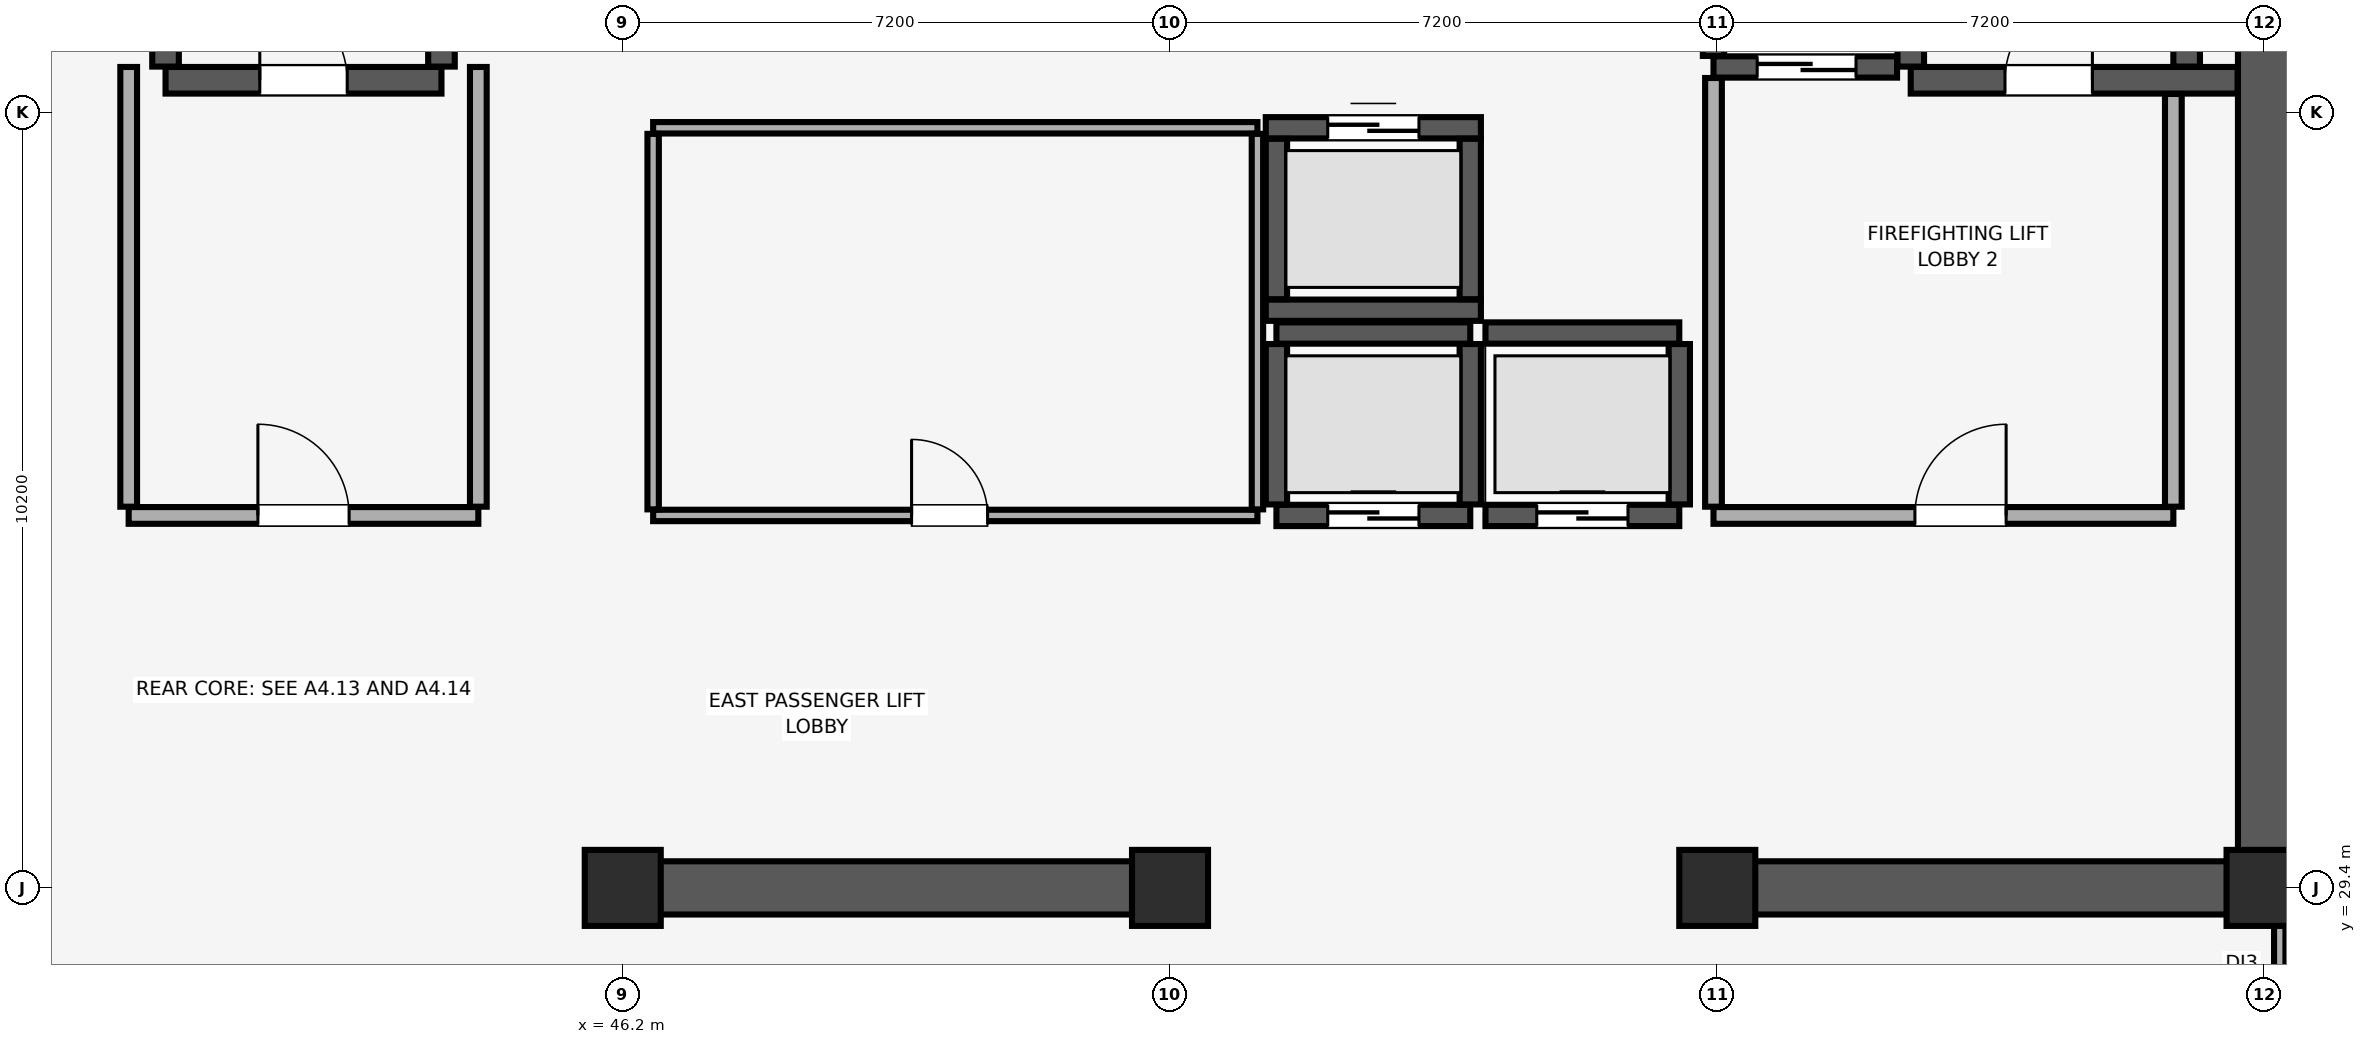
"""IFC4 building model, lengths in metres.
Left out: names, types, materials, properties, quantities, classifications, styles, units other than length and angle.
Written with IfcOpenShell. Run it as: python <this file> out.ifc"""

import sys

from ifc_helpers import new_model, si_unit, direction, frame, frame_2d, origin, origin_2d, place, context, subcontext, project, spatial, rectangle, extrude, element, fill, save


model = new_model("IFC4")
c1 = context("Model", 3, precision=1e-05, world=origin(), true_north=direction((0.0, 1.0)))
c2 = subcontext(c1, "Body", "Model", "MODEL_VIEW")
j1 = project(units=[si_unit("LENGTHUNIT", "METRE"), si_unit("PLANEANGLEUNIT", "RADIAN")], contexts=[c1])
p1 = place(None, origin())
s1 = spatial("IfcSite", under=j1, at=p1, CompositionType="ELEMENT")
p2 = place(p1, origin())
s2 = spatial("IfcBuilding", under=s1, at=p2, CompositionType="ELEMENT")
p3 = place(p2, frame((0.0, 0.0, 305.7)))
s3 = spatial("IfcBuildingStorey", under=s2, at=p3, CompositionType="ELEMENT", Elevation=305.7)
for number, where, z_axis, x_axis in (
    (1, (46.2, 29.4, 0.0), (0.0, 0.0, 1.0), (1.0, 0.0, 0.0)),
    (2, (53.4, 29.4, 0.0), (0.0, 0.0, 1.0), (1.0, 0.0, 0.0)),
    (3, (60.6, 29.4, 0.0), (0.0, 0.0, 1.0), (1.0, 0.0, 0.0)),
    (4, (67.8, 29.4, 0.0), (0.0, 0.0, 1.0), (1.0, 0.0, 0.0)),
):
    element("IfcColumn", number, at=place(p3, frame(where, z_axis=z_axis, x_axis=x_axis)), inside=s3, PredefinedType="COLUMN", context=c2, shape_type="SweptSolid", body=[
        extrude(rectangle(XDim=1.0, YDim=1.0, at=origin_2d()), origin(), (0.0, 0.0, 1.0), 4.7),
    ])
p4 = place(p3, frame((67.8, 29.4, 0.0), z_axis=(0.0, 0.0, 1.0), x_axis=(0.0, 1.0, 0.0)))
e5 = element("IfcWall", 5, at=p4, inside=s3, PredefinedType="SHEAR", context=c2, shape_type="SweptSolid", body=[
    extrude(rectangle(XDim=19.2, YDim=0.7, at=frame_2d((9.6, 0.0))), origin(), (0.0, 0.0, 1.0), 4.7),
])
p5 = place(p3, frame((46.0, 29.4, 0.0), z_axis=(0.0, 0.0, 1.0), x_axis=(1.0, 0.0, 0.0)))
e6 = element("IfcWall", 6, at=p5, inside=s3, PredefinedType="SHEAR", context=c2, shape_type="SweptSolid", body=[
    extrude(rectangle(XDim=7.6, YDim=0.7, at=frame_2d((3.8, 0.0))), origin(), (0.0, 0.0, 1.0), 4.7),
])
p6 = place(p3, frame((60.4, 29.4, 0.0), z_axis=(0.0, 0.0, 1.0), x_axis=(1.0, 0.0, 0.0)))
e7 = element("IfcWall", 7, at=p6, inside=s3, PredefinedType="SHEAR", context=c2, shape_type="SweptSolid", body=[
    extrude(rectangle(XDim=7.045, YDim=0.7, at=frame_2d((3.522, 0.0))), origin(), (0.0, 0.0, 1.0), 4.7),
])
p7 = place(p3, frame((40.185, 40.025, 0.0), z_axis=(0.0, 0.0, 1.0), x_axis=(1.0, 0.0, 0.0)))
e8 = element("IfcWall", 8, at=p7, inside=s3, PredefinedType="SHEAR", context=c2, shape_type="SweptSolid", body=[
    extrude(rectangle(XDim=3.63, YDim=0.35, at=frame_2d((1.815, 0.0))), origin(), (0.0, 0.0, 1.0), 4.7),
])
p8 = place(p7, frame((1.24, 0.0, 0.0)))
e9 = element("IfcOpeningElement", 9, at=p8, cuts=e8, PredefinedType="OPENING", context=c2, shape_type="SweptSolid", body=[
    extrude(rectangle(XDim=1.15, YDim=2.15, at=frame_2d((0.575, 1.075))), frame((0.0, 0.185, 0.0), z_axis=(0.0, -1.0, 0.0), x_axis=(1.0, 0.0, 0.0)), (0.0, 0.0, 1.0), 0.37),
])
for number, where, z_axis, x_axis in (
    (10, (40.185, 40.205, 0.0), (0.0, 0.0, 1.0), (0.0, 1.0, 0.0)),
    (11, (43.815, 40.205, 0.0), (0.0, 0.0, 1.0), (0.0, 1.0, 0.0)),
):
    element("IfcWall", number, at=place(p3, frame(where, z_axis=z_axis, x_axis=x_axis)), inside=s3, PredefinedType="SHEAR", context=c2, shape_type="SweptSolid", body=[
        extrude(rectangle(XDim=8.09, YDim=0.35, at=frame_2d((4.045, 0.0))), origin(), (0.0, 0.0, 1.0), 4.7),
    ])
p9 = place(p3, frame((63.145, 40.025, 0.0), z_axis=(0.0, 0.0, 1.0), x_axis=(1.0, 0.0, 0.0)))
e12 = element("IfcWall", 12, at=p9, inside=s3, PredefinedType="SHEAR", context=c2, shape_type="SweptSolid", body=[
    extrude(rectangle(XDim=4.3, YDim=0.35, at=frame_2d((2.15, 0.0))), origin(), (0.0, 0.0, 1.0), 4.7),
])
p10 = place(p9, frame((1.24, 0.0, 0.0)))
e13 = element("IfcOpeningElement", 13, at=p10, cuts=e12, PredefinedType="OPENING", context=c2, shape_type="SweptSolid", body=[
    extrude(rectangle(XDim=1.15, YDim=2.15, at=frame_2d((0.575, 1.075))), frame((0.0, 0.185, 0.0), z_axis=(0.0, -1.0, 0.0), x_axis=(1.0, 0.0, 0.0)), (0.0, 0.0, 1.0), 0.37),
])
for number, where, z_axis, x_axis in (
    (14, (63.145, 40.205, 0.0), (0.0, 0.0, 1.0), (0.0, 1.0, 0.0)),
    (15, (66.775, 40.205, 0.0), (0.0, 0.0, 1.0), (0.0, 1.0, 0.0)),
):
    element("IfcWall", number, at=place(p3, frame(where, z_axis=z_axis, x_axis=x_axis)), inside=s3, PredefinedType="SHEAR", context=c2, shape_type="SweptSolid", body=[
        extrude(rectangle(XDim=8.09, YDim=0.35, at=frame_2d((4.045, 0.0))), origin(), (0.0, 0.0, 1.0), 4.7),
    ])
p11 = place(p3, frame((54.8, 34.3, 0.0), z_axis=(0.0, 0.0, 1.0), x_axis=(1.0, 0.0, 0.0)))
e16 = element("IfcWall", 16, at=p11, inside=s3, PredefinedType="SHEAR", context=c2, shape_type="SweptSolid", body=[
    extrude(rectangle(XDim=2.55, YDim=0.28, at=frame_2d((1.275, 0.0))), origin(), (0.0, 0.0, 1.0), 4.7),
])
p12 = place(p11, frame((0.675, 0.0, 0.0)))
e17 = element("IfcOpeningElement", 17, at=p12, cuts=e16, PredefinedType="OPENING", context=c2, shape_type="SweptSolid", body=[
    extrude(rectangle(XDim=1.2, YDim=2.25, at=frame_2d((0.6, 1.125))), frame((0.0, 0.15, 0.0), z_axis=(0.0, -1.0, 0.0), x_axis=(1.0, 0.0, 0.0)), (0.0, 0.0, 1.0), 0.3),
])
p13 = place(p3, frame((54.8, 36.7, 0.0), z_axis=(0.0, 0.0, 1.0), x_axis=(1.0, 0.0, 0.0)))
e18 = element("IfcWall", 18, at=p13, inside=s3, PredefinedType="SHEAR", context=c2, shape_type="SweptSolid", body=[
    extrude(rectangle(XDim=2.55, YDim=0.28, at=frame_2d((1.275, 0.0))), origin(), (0.0, 0.0, 1.0), 4.7),
])
for number, where, z_axis, x_axis in (
    (19, (54.8, 34.445, 0.0), (0.0, 0.0, 1.0), (0.0, 1.0, 0.0)),
    (20, (57.35, 34.445, 0.0), (0.0, 0.0, 1.0), (0.0, 1.0, 0.0)),
):
    element("IfcWall", number, at=place(p3, frame(where, z_axis=z_axis, x_axis=x_axis)), inside=s3, PredefinedType="SHEAR", context=c2, shape_type="SweptSolid", body=[
        extrude(rectangle(XDim=2.11, YDim=0.28, at=frame_2d((1.055, 0.0))), origin(), (0.0, 0.0, 1.0), 4.7),
    ])
p14 = place(p3, frame((57.55, 34.3, 0.0), z_axis=(0.0, 0.0, 1.0), x_axis=(1.0, 0.0, 0.0)))
e21 = element("IfcWall", 21, at=p14, inside=s3, PredefinedType="SHEAR", context=c2, shape_type="SweptSolid", body=[
    extrude(rectangle(XDim=2.55, YDim=0.28, at=frame_2d((1.275, 0.0))), origin(), (0.0, 0.0, 1.0), 4.7),
])
p15 = place(p14, frame((0.675, 0.0, 0.0)))
e22 = element("IfcOpeningElement", 22, at=p15, cuts=e21, PredefinedType="OPENING", context=c2, shape_type="SweptSolid", body=[
    extrude(rectangle(XDim=1.2, YDim=2.25, at=frame_2d((0.6, 1.125))), frame((0.0, 0.15, 0.0), z_axis=(0.0, -1.0, 0.0), x_axis=(1.0, 0.0, 0.0)), (0.0, 0.0, 1.0), 0.3),
])
p16 = place(p3, frame((57.55, 36.7, 0.0), z_axis=(0.0, 0.0, 1.0), x_axis=(1.0, 0.0, 0.0)))
e23 = element("IfcWall", 23, at=p16, inside=s3, PredefinedType="SHEAR", context=c2, shape_type="SweptSolid", body=[
    extrude(rectangle(XDim=2.55, YDim=0.28, at=frame_2d((1.275, 0.0))), origin(), (0.0, 0.0, 1.0), 4.7),
])
p17 = place(p3, frame((60.1, 34.445, 0.0), z_axis=(0.0, 0.0, 1.0), x_axis=(0.0, 1.0, 0.0)))
e24 = element("IfcWall", 24, at=p17, inside=s3, PredefinedType="SHEAR", context=c2, shape_type="SweptSolid", body=[
    extrude(rectangle(XDim=2.11, YDim=0.28, at=frame_2d((1.055, 0.0))), origin(), (0.0, 0.0, 1.0), 4.7),
])
p18 = place(p3, frame((54.66, 37.0, 0.0), z_axis=(0.0, 0.0, 1.0), x_axis=(1.0, 0.0, 0.0)))
e25 = element("IfcWall", 25, at=p18, inside=s3, PredefinedType="SHEAR", context=c2, shape_type="SweptSolid", body=[
    extrude(rectangle(XDim=2.83, YDim=0.28, at=frame_2d((1.415, 0.0))), origin(), (0.0, 0.0, 1.0), 4.7),
])
p19 = place(p3, frame((54.66, 39.4, 0.0), z_axis=(0.0, 0.0, 1.0), x_axis=(1.0, 0.0, 0.0)))
e26 = element("IfcWall", 26, at=p19, inside=s3, PredefinedType="SHEAR", context=c2, shape_type="SweptSolid", body=[
    extrude(rectangle(XDim=2.83, YDim=0.28, at=frame_2d((1.415, 0.0))), origin(), (0.0, 0.0, 1.0), 4.7),
])
p20 = place(p19, frame((0.815, 0.0, 0.0)))
e27 = element("IfcOpeningElement", 27, at=p20, cuts=e26, PredefinedType="OPENING", context=c2, shape_type="SweptSolid", body=[
    extrude(rectangle(XDim=1.2, YDim=2.25, at=frame_2d((0.6, 1.125))), frame((0.0, 0.15, 0.0), z_axis=(0.0, -1.0, 0.0), x_axis=(1.0, 0.0, 0.0)), (0.0, 0.0, 1.0), 0.3),
])
for number, where, z_axis, x_axis in (
    (28, (54.8, 37.145, 0.0), (0.0, 0.0, 1.0), (0.0, 1.0, 0.0)),
    (29, (57.35, 37.145, 0.0), (0.0, 0.0, 1.0), (0.0, 1.0, 0.0)),
):
    element("IfcWall", number, at=place(p3, frame(where, z_axis=z_axis, x_axis=x_axis)), inside=s3, PredefinedType="SHEAR", context=c2, shape_type="SweptSolid", body=[
        extrude(rectangle(XDim=2.11, YDim=0.28, at=frame_2d((1.055, 0.0))), origin(), (0.0, 0.0, 1.0), 4.7),
    ])
p21 = place(p3, frame((60.55, 40.2, 0.0), z_axis=(0.0, 0.0, 1.0), x_axis=(1.0, 0.0, 0.0)))
e30 = element("IfcWall", 30, at=p21, inside=s3, PredefinedType="SHEAR", context=c2, shape_type="SweptSolid", body=[
    extrude(rectangle(XDim=2.415, YDim=0.28, at=frame_2d((1.208, 0.0))), origin(), (0.0, 0.0, 1.0), 4.7),
])
p22 = place(p21, frame((0.575, 0.0, 0.0)))
e31 = element("IfcOpeningElement", 31, at=p22, cuts=e30, PredefinedType="OPENING", context=c2, shape_type="SweptSolid", body=[
    extrude(rectangle(XDim=1.3, YDim=2.3, at=frame_2d((0.65, 1.15))), frame((0.0, 0.15, 0.0), z_axis=(0.0, -1.0, 0.0), x_axis=(1.0, 0.0, 0.0)), (0.0, 0.0, 1.0), 0.3),
])
p23 = place(p3, frame((60.55, 40.345, 0.0), z_axis=(0.0, 0.0, 1.0), x_axis=(0.0, 1.0, 0.0)))
e32 = element("IfcWall", 32, at=p23, inside=s3, PredefinedType="SHEAR", context=c2, shape_type="SweptSolid", body=[
    extrude(rectangle(XDim=2.81, YDim=0.28, at=frame_2d((1.405, 0.0))), origin(), (0.0, 0.0, 1.0), 4.7),
])
p24 = place(p3, frame((60.55, 34.3, 0.0), z_axis=(0.0, 0.0, 1.0), x_axis=(1.0, 0.0, 0.0)))
e33 = element("IfcWall", 33, at=p24, inside=s3, PredefinedType="PARTITIONING", context=c2, shape_type="SweptSolid", body=[
    extrude(rectangle(XDim=6.05, YDim=0.22, at=frame_2d((3.025, 0.0))), origin(), (0.0, 0.0, 1.0), 4.7),
])
p25 = place(p24, frame((2.65, 0.0, 0.0)))
e34 = element("IfcOpeningElement", 34, at=p25, cuts=e33, PredefinedType="OPENING", context=c2, shape_type="SweptSolid", body=[
    extrude(rectangle(XDim=1.2, YDim=2.15, at=frame_2d((0.6, 1.075))), frame((0.0, 0.12, 0.0), z_axis=(0.0, -1.0, 0.0), x_axis=(1.0, 0.0, 0.0)), (0.0, 0.0, 1.0), 0.24),
])
p26 = place(p3, frame((60.55, 34.415, 0.0), z_axis=(0.0, 0.0, 1.0), x_axis=(0.0, 1.0, 0.0)))
e35 = element("IfcWall", 35, at=p26, inside=s3, PredefinedType="PARTITIONING", context=c2, shape_type="SweptSolid", body=[
    extrude(rectangle(XDim=5.64, YDim=0.22, at=frame_2d((2.82, 0.0))), origin(), (0.0, 0.0, 1.0), 4.7),
])
p27 = place(p3, frame((66.6, 34.415, 0.0), z_axis=(0.0, 0.0, 1.0), x_axis=(0.0, 1.0, 0.0)))
e36 = element("IfcWall", 36, at=p27, inside=s3, PredefinedType="PARTITIONING", context=c2, shape_type="SweptSolid", body=[
    extrude(rectangle(XDim=5.43, YDim=0.22, at=frame_2d((2.715, 0.0))), origin(), (0.0, 0.0, 1.0), 4.7),
])
p28 = place(p3, frame((39.7, 34.3, 0.0), z_axis=(0.0, 0.0, 1.0), x_axis=(1.0, 0.0, 0.0)))
e37 = element("IfcWall", 37, at=p28, inside=s3, PredefinedType="PARTITIONING", context=c2, shape_type="SweptSolid", body=[
    extrude(rectangle(XDim=4.6, YDim=0.22, at=frame_2d((2.3, 0.0))), origin(), (0.0, 0.0, 1.0), 4.7),
])
p29 = place(p28, frame((1.7, 0.0, 0.0)))
e38 = element("IfcOpeningElement", 38, at=p29, cuts=e37, PredefinedType="OPENING", context=c2, shape_type="SweptSolid", body=[
    extrude(rectangle(XDim=1.2, YDim=2.15, at=frame_2d((0.6, 1.075))), frame((0.0, 0.12, 0.0), z_axis=(0.0, -1.0, 0.0), x_axis=(1.0, 0.0, 0.0)), (0.0, 0.0, 1.0), 0.24),
])
for number, where, z_axis, x_axis in (
    (39, (39.7, 34.415, 0.0), (0.0, 0.0, 1.0), (0.0, 1.0, 0.0)),
    (40, (44.3, 34.415, 0.0), (0.0, 0.0, 1.0), (0.0, 1.0, 0.0)),
):
    element("IfcWall", number, at=place(p3, frame(where, z_axis=z_axis, x_axis=x_axis)), inside=s3, PredefinedType="PARTITIONING", context=c2, shape_type="SweptSolid", body=[
        extrude(rectangle(XDim=5.785, YDim=0.22, at=frame_2d((2.893, 0.0))), origin(), (0.0, 0.0, 1.0), 4.7),
    ])
p30 = place(p3, frame((46.6, 34.3, 0.0), z_axis=(0.0, 0.0, 1.0), x_axis=(1.0, 0.0, 0.0)))
e41 = element("IfcWall", 41, at=p30, inside=s3, PredefinedType="PARTITIONING", context=c2, shape_type="SweptSolid", body=[
    extrude(rectangle(XDim=7.95, YDim=0.15, at=frame_2d((3.975, 0.0))), origin(), (0.0, 0.0, 1.0), 4.7),
])
p31 = place(p30, frame((3.4, 0.0, 0.0)))
e42 = element("IfcOpeningElement", 42, at=p31, cuts=e41, PredefinedType="OPENING", context=c2, shape_type="SweptSolid", body=[
    extrude(rectangle(XDim=1.0, YDim=2.15, at=frame_2d((0.5, 1.075))), frame((0.0, 0.085, 0.0), z_axis=(0.0, -1.0, 0.0), x_axis=(1.0, 0.0, 0.0)), (0.0, 0.0, 1.0), 0.17),
])
p32 = place(p3, frame((46.6, 39.4, 0.0), z_axis=(0.0, 0.0, 1.0), x_axis=(1.0, 0.0, 0.0)))
e43 = element("IfcWall", 43, at=p32, inside=s3, PredefinedType="PARTITIONING", context=c2, shape_type="SweptSolid", body=[
    extrude(rectangle(XDim=7.95, YDim=0.15, at=frame_2d((3.975, 0.0))), origin(), (0.0, 0.0, 1.0), 4.7),
])
for number, where, z_axis, x_axis in (
    (44, (46.6, 34.38, 0.0), (0.0, 0.0, 1.0), (0.0, 1.0, 0.0)),
    (45, (54.55, 34.38, 0.0), (0.0, 0.0, 1.0), (0.0, 1.0, 0.0)),
):
    element("IfcWall", number, at=place(p3, frame(where, z_axis=z_axis, x_axis=x_axis)), inside=s3, PredefinedType="PARTITIONING", context=c2, shape_type="SweptSolid", body=[
        extrude(rectangle(XDim=4.94, YDim=0.15, at=frame_2d((2.47, 0.0))), origin(), (0.0, 0.0, 1.0), 4.7),
    ])
p33 = place(p3, frame((68.0, 25.08, 0.0), z_axis=(0.0, 0.0, 1.0), x_axis=(0.0, 1.0, 0.0)))
e46 = element("IfcWall", 46, at=p33, inside=s3, PredefinedType="PARTITIONING", context=c2, shape_type="SweptSolid", body=[
    extrude(rectangle(XDim=4.31, YDim=0.15, at=frame_2d((2.155, 0.0))), origin(), (0.0, 0.0, 1.0), 4.7),
])
p34 = place(p33, frame((1.62, 0.0, 0.0)))
e47 = element("IfcOpeningElement", 47, at=p34, cuts=e46, PredefinedType="OPENING", context=c2, shape_type="SweptSolid", body=[
    extrude(rectangle(XDim=1.0, YDim=2.15, at=frame_2d((0.5, 1.075))), frame((0.0, 0.085, 0.0), z_axis=(0.0, -1.0, 0.0), x_axis=(1.0, 0.0, 0.0)), (0.0, 0.0, 1.0), 0.17),
])
p35 = place(p8, origin())
e48 = element("IfcDoor", 48, at=p35, inside=s3, OperationType="SINGLE_SWING_LEFT", PredefinedType="DOOR", context=c2, shape_type="SweptSolid", body=[
    extrude(rectangle(XDim=1.15, YDim=2.15, at=frame_2d((0.575, 1.075))), frame((0.0, 0.025, 0.0), z_axis=(0.0, -1.0, 0.0), x_axis=(1.0, 0.0, 0.0)), (0.0, 0.0, 1.0), 0.05),
])
fill(e9, e48)
p36 = place(p10, origin())
e49 = element("IfcDoor", 49, at=p36, inside=s3, OperationType="SINGLE_SWING_RIGHT", PredefinedType="DOOR", context=c2, shape_type="SweptSolid", body=[
    extrude(rectangle(XDim=1.15, YDim=2.15, at=frame_2d((0.575, 1.075))), frame((0.0, 0.025, 0.0), z_axis=(0.0, -1.0, 0.0), x_axis=(1.0, 0.0, 0.0)), (0.0, 0.0, 1.0), 0.05),
])
fill(e13, e49)
p37 = place(p12, origin())
e50 = element("IfcDoor", 50, at=p37, inside=s3, OperationType="DOUBLE_DOOR_SLIDING", PredefinedType="DOOR", context=c2, shape_type="SweptSolid", body=[
    extrude(rectangle(XDim=1.2, YDim=2.25, at=frame_2d((0.6, 1.125))), frame((0.0, 0.025, 0.0), z_axis=(0.0, -1.0, 0.0), x_axis=(1.0, 0.0, 0.0)), (0.0, 0.0, 1.0), 0.05),
])
fill(e17, e50)
p38 = place(p15, origin())
e51 = element("IfcDoor", 51, at=p38, inside=s3, OperationType="DOUBLE_DOOR_SLIDING", PredefinedType="DOOR", context=c2, shape_type="SweptSolid", body=[
    extrude(rectangle(XDim=1.2, YDim=2.25, at=frame_2d((0.6, 1.125))), frame((0.0, 0.025, 0.0), z_axis=(0.0, -1.0, 0.0), x_axis=(1.0, 0.0, 0.0)), (0.0, 0.0, 1.0), 0.05),
])
fill(e22, e51)
p39 = place(p20, origin())
e52 = element("IfcDoor", 52, at=p39, inside=s3, OperationType="DOUBLE_DOOR_SLIDING", PredefinedType="DOOR", context=c2, shape_type="SweptSolid", body=[
    extrude(rectangle(XDim=1.2, YDim=2.25, at=frame_2d((0.6, 1.125))), frame((0.0, 0.025, 0.0), z_axis=(0.0, -1.0, 0.0), x_axis=(1.0, 0.0, 0.0)), (0.0, 0.0, 1.0), 0.05),
])
fill(e27, e52)
p40 = place(p22, origin())
e53 = element("IfcDoor", 53, at=p40, inside=s3, OperationType="DOUBLE_DOOR_SLIDING", PredefinedType="DOOR", context=c2, shape_type="SweptSolid", body=[
    extrude(rectangle(XDim=1.3, YDim=2.3, at=frame_2d((0.65, 1.15))), frame((0.0, 0.025, 0.0), z_axis=(0.0, -1.0, 0.0), x_axis=(1.0, 0.0, 0.0)), (0.0, 0.0, 1.0), 0.05),
])
fill(e31, e53)
p41 = place(p25, origin())
e54 = element("IfcDoor", 54, at=p41, inside=s3, OperationType="SINGLE_SWING_RIGHT", PredefinedType="DOOR", context=c2, shape_type="SweptSolid", body=[
    extrude(rectangle(XDim=1.2, YDim=2.15, at=frame_2d((0.6, 1.075))), frame((0.0, 0.025, 0.0), z_axis=(0.0, -1.0, 0.0), x_axis=(1.0, 0.0, 0.0)), (0.0, 0.0, 1.0), 0.05),
])
fill(e34, e54)
p42 = place(p29, origin())
e55 = element("IfcDoor", 55, at=p42, inside=s3, OperationType="SINGLE_SWING_LEFT", PredefinedType="DOOR", context=c2, shape_type="SweptSolid", body=[
    extrude(rectangle(XDim=1.2, YDim=2.15, at=frame_2d((0.6, 1.075))), frame((0.0, 0.025, 0.0), z_axis=(0.0, -1.0, 0.0), x_axis=(1.0, 0.0, 0.0)), (0.0, 0.0, 1.0), 0.05),
])
fill(e38, e55)
p43 = place(p31, origin())
e56 = element("IfcDoor", 56, at=p43, inside=s3, OperationType="SINGLE_SWING_LEFT", PredefinedType="DOOR", context=c2, shape_type="SweptSolid", body=[
    extrude(rectangle(XDim=1.0, YDim=2.15, at=frame_2d((0.5, 1.075))), frame((0.0, 0.025, 0.0), z_axis=(0.0, -1.0, 0.0), x_axis=(1.0, 0.0, 0.0)), (0.0, 0.0, 1.0), 0.05),
])
fill(e42, e56)
save(model, sys.argv[1])
